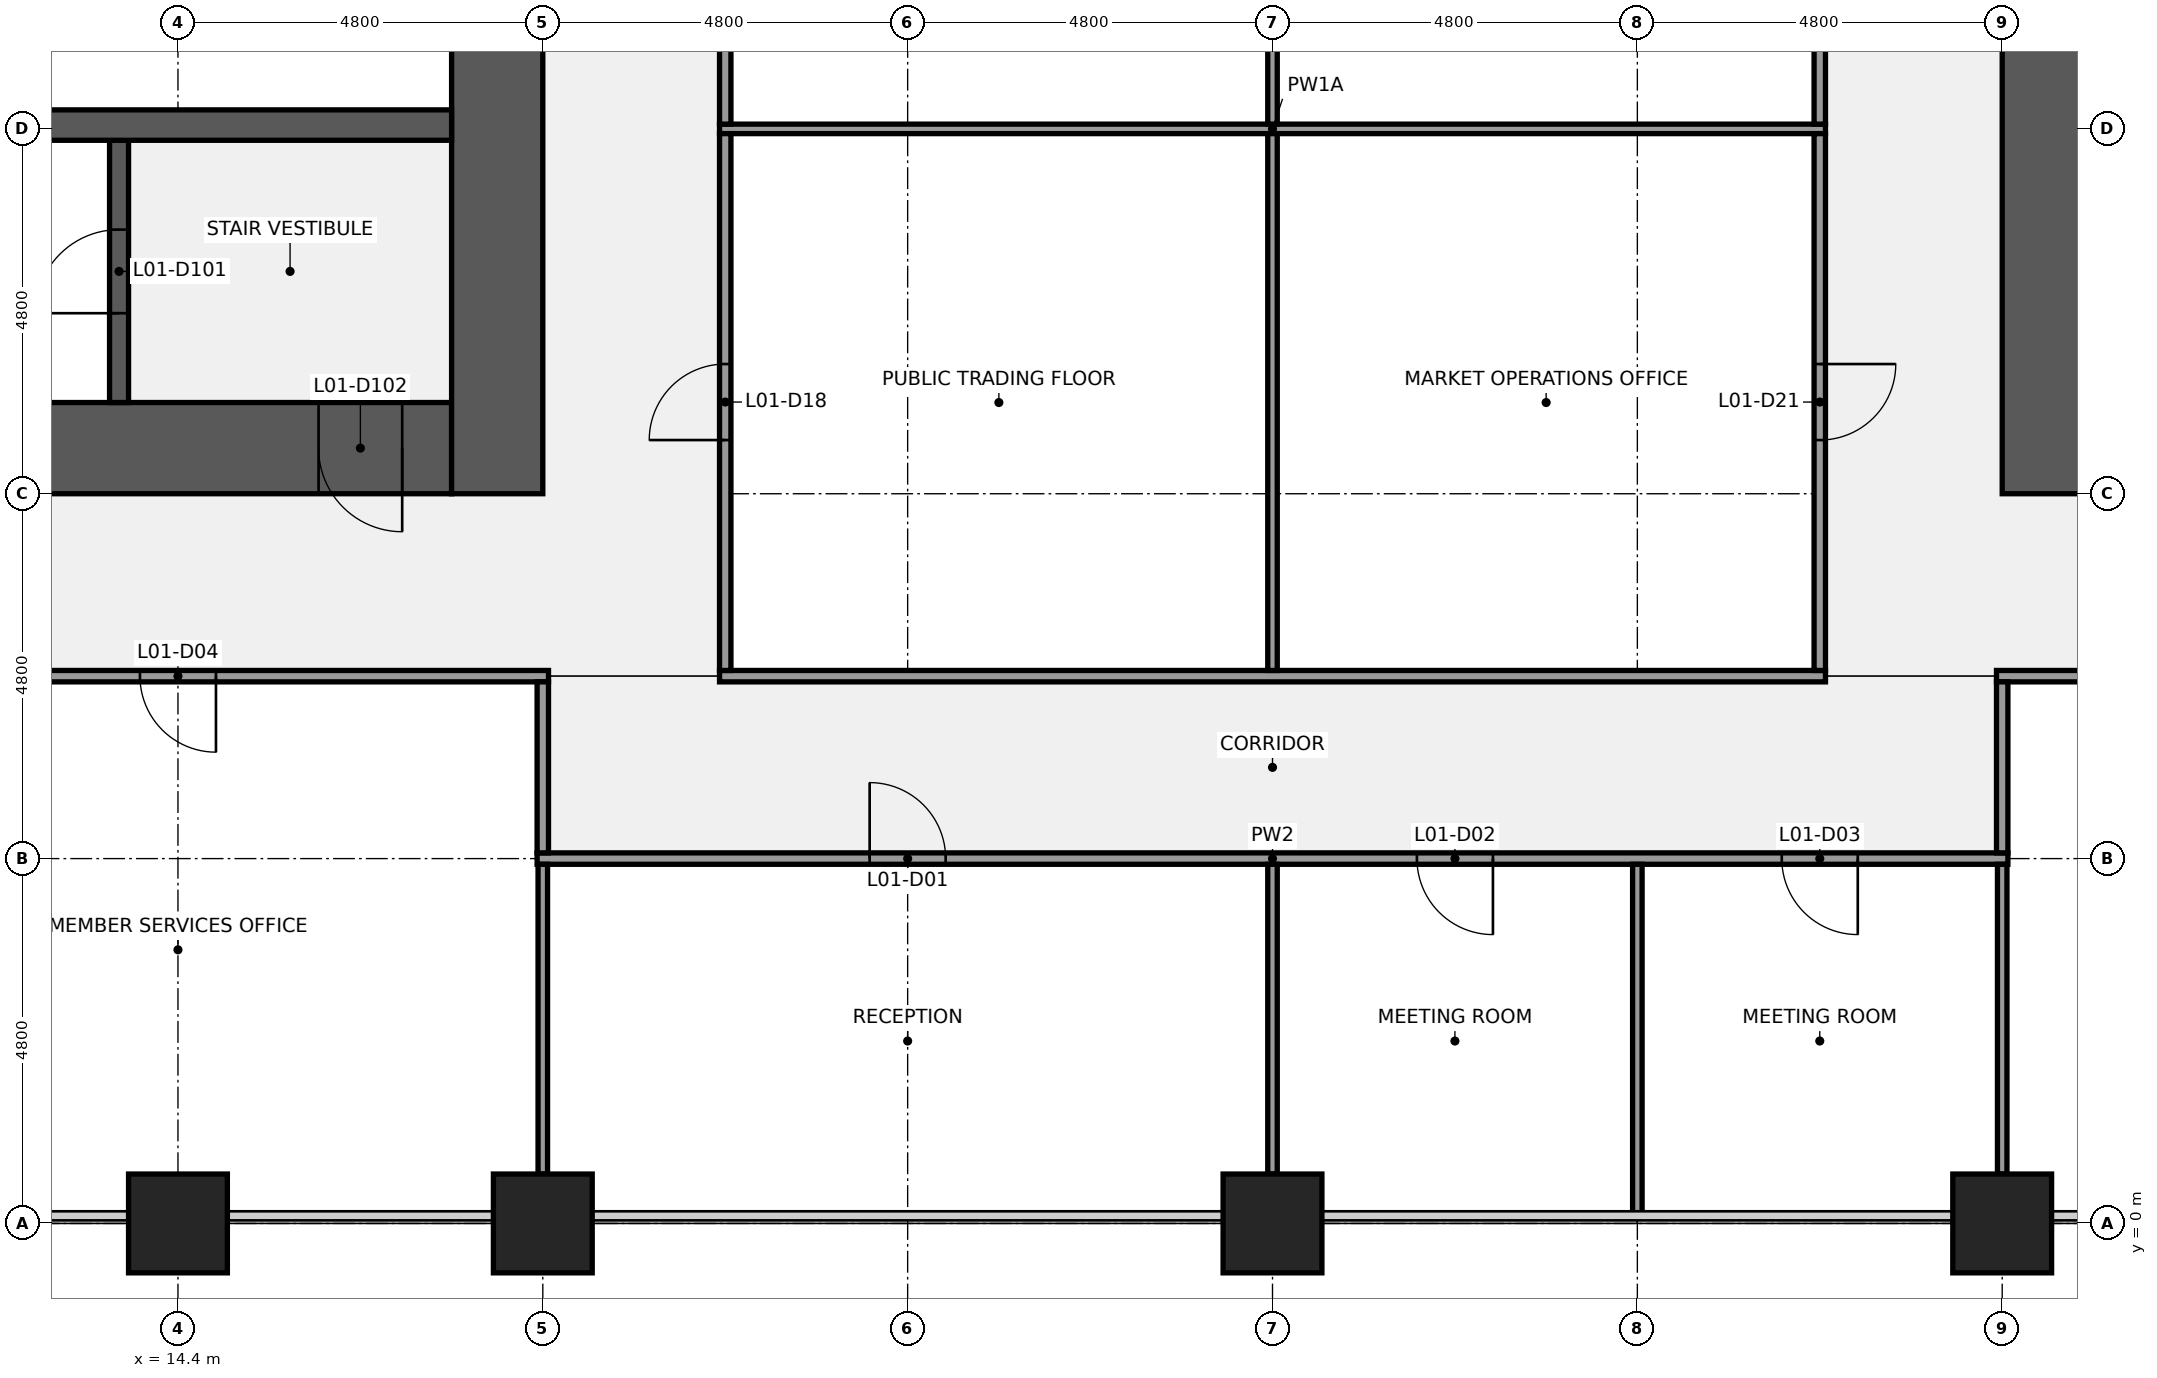
"""IFC4 building model, lengths in metres.
Left out: names, types, materials, properties, quantities, classifications, styles, units other than length and angle.
Written with IfcOpenShell. Run it as: python <this file> out.ifc"""

import sys

from ifc_helpers import new_model, si_unit, direction, frame, frame_2d, origin, origin_2d, place, context, subcontext, project, spatial, rectangle, extrude, element, fill, save


model = new_model("IFC4")
c1 = context("Model", 3, precision=1e-05, world=origin(), true_north=direction((0.0, 1.0)))
c2 = subcontext(c1, "Body", "Model", "MODEL_VIEW")
j1 = project(units=[si_unit("LENGTHUNIT", "METRE"), si_unit("PLANEANGLEUNIT", "RADIAN")], contexts=[c1])
p1 = place(None, origin())
s1 = spatial("IfcSite", under=j1, at=p1, CompositionType="ELEMENT")
p2 = place(p1, origin())
s2 = spatial("IfcBuilding", under=s1, at=p2, CompositionType="ELEMENT")
p3 = place(p2, frame((0.0, 0.0, 12.6)))
s3 = spatial("IfcBuildingStorey", under=s2, at=p3, CompositionType="ELEMENT", Elevation=12.6)
for number, where, z_axis, x_axis in (
    (1, (14.4, 0.0, 0.0), (0.0, 0.0, 1.0), (1.0, 0.0, 0.0)),
    (2, (19.2, 0.0, 0.0), (0.0, 0.0, 1.0), (1.0, 0.0, 0.0)),
    (3, (28.8, 0.0, 0.0), (0.0, 0.0, 1.0), (1.0, 0.0, 0.0)),
    (4, (38.4, 0.0, 0.0), (0.0, 0.0, 1.0), (1.0, 0.0, 0.0)),
):
    element("IfcColumn", number, at=place(p3, frame(where, z_axis=z_axis, x_axis=x_axis)), inside=s3, PredefinedType="COLUMN", context=c2, shape_type="SweptSolid", body=[
        extrude(rectangle(XDim=1.3, YDim=1.3, at=origin_2d()), origin(), (0.0, 0.0, 1.0), 4.4),
    ])
p4 = place(p3, frame((18.0, 10.2, 0.0), z_axis=(0.0, 0.0, 1.0), x_axis=(-1.0, 0.0, 0.0)))
e5 = element("IfcWall", 5, at=p4, inside=s3, PredefinedType="SHEAR", context=c2, shape_type="SweptSolid", body=[
    extrude(rectangle(XDim=13.2, YDim=1.2, at=frame_2d((6.6, 0.0))), origin(), (0.0, 0.0, 1.0), 4.24),
])
p5 = place(p4, frame((0.65, 0.0, 0.0)))
e6 = element("IfcOpeningElement", 6, at=p5, cuts=e5, PredefinedType="OPENING", context=c2, shape_type="SweptSolid", body=[
    extrude(rectangle(XDim=1.1, YDim=2.1, at=frame_2d((0.55, 1.05))), frame((0.0, 0.61, 0.0), z_axis=(0.0, -1.0, 0.0), x_axis=(1.0, 0.0, 0.0)), (0.0, 0.0, 1.0), 1.22),
])
p6 = place(p3, frame((18.6, 38.4, 0.0), z_axis=(0.0, 0.0, 1.0), x_axis=(0.0, -1.0, 0.0)))
e7 = element("IfcWall", 7, at=p6, inside=s3, PredefinedType="SHEAR", context=c2, shape_type="SweptSolid", body=[
    extrude(rectangle(XDim=28.8, YDim=1.2, at=frame_2d((14.4, 0.0))), origin(), (0.0, 0.0, 1.0), 4.24),
])
p7 = place(p6, frame((18.3, 0.0, 0.0)))
e8 = element("IfcOpeningElement", 8, at=p7, cuts=e7, PredefinedType="OPENING", context=c2, shape_type="SweptSolid", body=[
    extrude(rectangle(XDim=1.8, YDim=2.1, at=frame_2d((0.9, 1.05))), frame((0.0, 0.61, 0.0), z_axis=(0.0, -1.0, 0.0), x_axis=(1.0, 0.0, 0.0)), (0.0, 0.0, 1.0), 1.22),
])
p8 = place(p6, frame((8.7, 0.0, 0.0)))
e9 = element("IfcOpeningElement", 9, at=p8, cuts=e7, PredefinedType="OPENING", context=c2, shape_type="SweptSolid", body=[
    extrude(rectangle(XDim=1.8, YDim=2.1, at=frame_2d((0.9, 1.05))), frame((0.0, 0.61, 0.0), z_axis=(0.0, -1.0, 0.0), x_axis=(1.0, 0.0, 0.0)), (0.0, 0.0, 1.0), 1.22),
])
p9 = place(p3, frame((13.625, 10.8, 0.0), z_axis=(0.0, 0.0, 1.0), x_axis=(0.0, 1.0, 0.0)))
e10 = element("IfcWall", 10, at=p9, inside=s3, PredefinedType="SHEAR", context=c2, shape_type="SweptSolid", body=[
    extrude(rectangle(XDim=3.45, YDim=0.25, at=frame_2d((1.725, 0.0))), origin(), (0.0, 0.0, 1.0), 4.24),
])
p10 = place(p9, frame((1.175, 0.0, 0.0)))
e11 = element("IfcOpeningElement", 11, at=p10, cuts=e10, PredefinedType="OPENING", context=c2, shape_type="SweptSolid", body=[
    extrude(rectangle(XDim=1.1, YDim=2.1, at=frame_2d((0.55, 1.05))), frame((0.0, 0.135, 0.0), z_axis=(0.0, -1.0, 0.0), x_axis=(1.0, 0.0, 0.0)), (0.0, 0.0, 1.0), 0.27),
])
p11 = place(p3, frame((1.2, 14.45, 0.0), z_axis=(0.0, 0.0, 1.0), x_axis=(1.0, 0.0, 0.0)))
e12 = element("IfcWall", 12, at=p11, inside=s3, PredefinedType="SHEAR", context=c2, shape_type="SweptSolid", body=[
    extrude(rectangle(XDim=16.8, YDim=0.4, at=frame_2d((8.4, 0.0))), origin(), (0.0, 0.0, 1.0), 4.24),
])
p12 = place(p3, frame((39.0, 9.6, 0.0), z_axis=(0.0, 0.0, 1.0), x_axis=(0.0, 1.0, 0.0)))
e13 = element("IfcWall", 13, at=p12, inside=s3, PredefinedType="SHEAR", context=c2, shape_type="SweptSolid", body=[
    extrude(rectangle(XDim=28.8, YDim=1.2, at=frame_2d((14.4, 0.0))), origin(), (0.0, 0.0, 1.0), 4.24),
])
p13 = place(p12, frame((8.7, 0.0, 0.0)))
e14 = element("IfcOpeningElement", 14, at=p13, cuts=e13, PredefinedType="OPENING", context=c2, shape_type="SweptSolid", body=[
    extrude(rectangle(XDim=1.8, YDim=2.1, at=frame_2d((0.9, 1.05))), frame((0.0, 0.61, 0.0), z_axis=(0.0, -1.0, 0.0), x_axis=(1.0, 0.0, 0.0)), (0.0, 0.0, 1.0), 1.22),
])
p14 = place(p12, frame((18.3, 0.0, 0.0)))
e15 = element("IfcOpeningElement", 15, at=p14, cuts=e13, PredefinedType="OPENING", context=c2, shape_type="SweptSolid", body=[
    extrude(rectangle(XDim=1.8, YDim=2.1, at=frame_2d((0.9, 1.05))), frame((0.0, 0.61, 0.0), z_axis=(0.0, -1.0, 0.0), x_axis=(1.0, 0.0, 0.0)), (0.0, 0.0, 1.0), 1.22),
])
p15 = place(p3, frame((19.125, 4.8, 0.0), z_axis=(0.0, 0.0, 1.0), x_axis=(1.0, 0.0, 0.0)))
e16 = element("IfcWall", 16, at=p15, inside=s3, PredefinedType="PARTITIONING", context=c2, shape_type="SweptSolid", body=[
    extrude(rectangle(XDim=19.35, YDim=0.15, at=frame_2d((9.675, 0.0))), origin(), (0.0, 0.0, 1.0), 3.27),
])
p16 = place(p15, frame((4.375, 0.0, 0.0)))
e17 = element("IfcOpeningElement", 17, at=p16, cuts=e16, PredefinedType="OPENING", context=c2, shape_type="SweptSolid", body=[
    extrude(rectangle(XDim=1.0, YDim=2.1, at=frame_2d((0.5, 1.05))), frame((0.0, 0.085, 0.0), z_axis=(0.0, -1.0, 0.0), x_axis=(1.0, 0.0, 0.0)), (0.0, 0.0, 1.0), 0.17),
])
p17 = place(p15, frame((11.575, 0.0, 0.0)))
e18 = element("IfcOpeningElement", 18, at=p17, cuts=e16, PredefinedType="OPENING", context=c2, shape_type="SweptSolid", body=[
    extrude(rectangle(XDim=1.0, YDim=2.1, at=frame_2d((0.5, 1.05))), frame((0.0, 0.085, 0.0), z_axis=(0.0, -1.0, 0.0), x_axis=(1.0, 0.0, 0.0)), (0.0, 0.0, 1.0), 0.17),
])
p18 = place(p15, frame((16.375, 0.0, 0.0)))
e19 = element("IfcOpeningElement", 19, at=p18, cuts=e16, PredefinedType="OPENING", context=c2, shape_type="SweptSolid", body=[
    extrude(rectangle(XDim=1.0, YDim=2.1, at=frame_2d((0.5, 1.05))), frame((0.0, 0.085, 0.0), z_axis=(0.0, -1.0, 0.0), x_axis=(1.0, 0.0, 0.0)), (0.0, 0.0, 1.0), 0.17),
])
p19 = place(p3, frame((9.525, 7.2, 0.0), z_axis=(0.0, 0.0, 1.0), x_axis=(1.0, 0.0, 0.0)))
e20 = element("IfcWall", 20, at=p19, inside=s3, PredefinedType="PARTITIONING", context=c2, shape_type="SweptSolid", body=[
    extrude(rectangle(XDim=9.75, YDim=0.15, at=frame_2d((4.875, 0.0))), origin(), (0.0, 0.0, 1.0), 3.27),
])
p20 = place(p19, frame((4.375, 0.0, 0.0)))
e21 = element("IfcOpeningElement", 21, at=p20, cuts=e20, PredefinedType="OPENING", context=c2, shape_type="SweptSolid", body=[
    extrude(rectangle(XDim=1.0, YDim=2.1, at=frame_2d((0.5, 1.05))), frame((0.0, 0.085, 0.0), z_axis=(0.0, -1.0, 0.0), x_axis=(1.0, 0.0, 0.0)), (0.0, 0.0, 1.0), 0.17),
])
p21 = place(p3, frame((21.525, 7.2, 0.0), z_axis=(0.0, 0.0, 1.0), x_axis=(1.0, 0.0, 0.0)))
e22 = element("IfcWall", 22, at=p21, inside=s3, PredefinedType="PARTITIONING", context=c2, shape_type="SweptSolid", body=[
    extrude(rectangle(XDim=14.55, YDim=0.15, at=frame_2d((7.275, 0.0))), origin(), (0.0, 0.0, 1.0), 3.27),
])
p22 = place(p3, frame((38.325, 7.2, 0.0), z_axis=(0.0, 0.0, 1.0), x_axis=(1.0, 0.0, 0.0)))
e23 = element("IfcWall", 23, at=p22, inside=s3, PredefinedType="PARTITIONING", context=c2, shape_type="SweptSolid", body=[
    extrude(rectangle(XDim=9.75, YDim=0.15, at=frame_2d((4.875, 0.0))), origin(), (0.0, 0.0, 1.0), 3.27),
])
p23 = place(p22, frame((4.375, 0.0, 0.0)))
e24 = element("IfcOpeningElement", 24, at=p23, cuts=e23, PredefinedType="OPENING", context=c2, shape_type="SweptSolid", body=[
    extrude(rectangle(XDim=1.0, YDim=2.1, at=frame_2d((0.5, 1.05))), frame((0.0, 0.085, 0.0), z_axis=(0.0, -1.0, 0.0), x_axis=(1.0, 0.0, 0.0)), (0.0, 0.0, 1.0), 0.17),
])
p24 = place(p3, frame((21.525, 14.4, 0.0), z_axis=(0.0, 0.0, 1.0), x_axis=(1.0, 0.0, 0.0)))
e25 = element("IfcWall", 25, at=p24, inside=s3, PredefinedType="PARTITIONING", context=c2, shape_type="SweptSolid", body=[
    extrude(rectangle(XDim=14.55, YDim=0.125, at=frame_2d((7.275, 0.0))), origin(), (0.0, 0.0, 1.0), 3.27),
])
p25 = place(p3, frame((19.2, 0.65, 0.0), z_axis=(0.0, 0.0, 1.0), x_axis=(0.0, 1.0, 0.0)))
e26 = element("IfcWall", 26, at=p25, inside=s3, PredefinedType="PARTITIONING", context=c2, shape_type="SweptSolid", body=[
    extrude(rectangle(XDim=4.075, YDim=0.125, at=frame_2d((2.038, 0.0))), origin(), (0.0, 0.0, 1.0), 3.27),
])
p26 = place(p3, frame((19.2, 4.875, 0.0), z_axis=(0.0, 0.0, 1.0), x_axis=(0.0, 1.0, 0.0)))
e27 = element("IfcWall", 27, at=p26, inside=s3, PredefinedType="PARTITIONING", context=c2, shape_type="SweptSolid", body=[
    extrude(rectangle(XDim=2.25, YDim=0.15, at=frame_2d((1.125, 0.0))), origin(), (0.0, 0.0, 1.0), 3.27),
])
p27 = place(p3, frame((21.6, 7.275, 0.0), z_axis=(0.0, 0.0, 1.0), x_axis=(0.0, 1.0, 0.0)))
e28 = element("IfcWall", 28, at=p27, inside=s3, PredefinedType="PARTITIONING", context=c2, shape_type="SweptSolid", body=[
    extrude(rectangle(XDim=7.062, YDim=0.15, at=frame_2d((3.531, 0.0))), origin(), (0.0, 0.0, 1.0), 3.27),
])
p28 = place(p27, frame((3.031, 0.0, 0.0)))
e29 = element("IfcOpeningElement", 29, at=p28, cuts=e28, PredefinedType="OPENING", context=c2, shape_type="SweptSolid", body=[
    extrude(rectangle(XDim=1.0, YDim=2.1, at=frame_2d((0.5, 1.05))), frame((0.0, 0.085, 0.0), z_axis=(0.0, -1.0, 0.0), x_axis=(1.0, 0.0, 0.0)), (0.0, 0.0, 1.0), 0.17),
])
p29 = place(p3, frame((21.6, 14.462, 0.0), z_axis=(0.0, 0.0, 1.0), x_axis=(0.0, 1.0, 0.0)))
e30 = element("IfcWall", 30, at=p29, inside=s3, PredefinedType="PARTITIONING", context=c2, shape_type="SweptSolid", body=[
    extrude(rectangle(XDim=9.475, YDim=0.15, at=frame_2d((4.738, 0.0))), origin(), (0.0, 0.0, 1.0), 3.27),
])
p30 = place(p29, frame((4.238, 0.0, 0.0)))
e31 = element("IfcOpeningElement", 31, at=p30, cuts=e30, PredefinedType="OPENING", context=c2, shape_type="SweptSolid", body=[
    extrude(rectangle(XDim=1.0, YDim=2.1, at=frame_2d((0.5, 1.05))), frame((0.0, 0.085, 0.0), z_axis=(0.0, -1.0, 0.0), x_axis=(1.0, 0.0, 0.0)), (0.0, 0.0, 1.0), 0.17),
])
p31 = place(p3, frame((28.8, 0.65, 0.0), z_axis=(0.0, 0.0, 1.0), x_axis=(0.0, 1.0, 0.0)))
e32 = element("IfcWall", 32, at=p31, inside=s3, PredefinedType="PARTITIONING", context=c2, shape_type="SweptSolid", body=[
    extrude(rectangle(XDim=4.075, YDim=0.125, at=frame_2d((2.038, 0.0))), origin(), (0.0, 0.0, 1.0), 3.27),
])
p32 = place(p3, frame((28.8, 7.275, 0.0), z_axis=(0.0, 0.0, 1.0), x_axis=(0.0, 1.0, 0.0)))
e33 = element("IfcWall", 33, at=p32, inside=s3, PredefinedType="PARTITIONING", context=c2, shape_type="SweptSolid", body=[
    extrude(rectangle(XDim=7.062, YDim=0.125, at=frame_2d((3.531, 0.0))), origin(), (0.0, 0.0, 1.0), 3.27),
])
p33 = place(p3, frame((28.8, 14.462, 0.0), z_axis=(0.0, 0.0, 1.0), x_axis=(0.0, 1.0, 0.0)))
e34 = element("IfcWall", 34, at=p33, inside=s3, PredefinedType="PARTITIONING", context=c2, shape_type="SweptSolid", body=[
    extrude(rectangle(XDim=9.475, YDim=0.125, at=frame_2d((4.738, 0.0))), origin(), (0.0, 0.0, 1.0), 3.27),
])
p34 = place(p3, frame((33.6, 0.1, 0.0), z_axis=(0.0, 0.0, 1.0), x_axis=(0.0, 1.0, 0.0)))
e35 = element("IfcWall", 35, at=p34, inside=s3, PredefinedType="PARTITIONING", context=c2, shape_type="SweptSolid", body=[
    extrude(rectangle(XDim=4.625, YDim=0.125, at=frame_2d((2.312, 0.0))), origin(), (0.0, 0.0, 1.0), 3.27),
])
p35 = place(p3, frame((36.0, 7.275, 0.0), z_axis=(0.0, 0.0, 1.0), x_axis=(0.0, 1.0, 0.0)))
e36 = element("IfcWall", 36, at=p35, inside=s3, PredefinedType="PARTITIONING", context=c2, shape_type="SweptSolid", body=[
    extrude(rectangle(XDim=7.062, YDim=0.15, at=frame_2d((3.531, 0.0))), origin(), (0.0, 0.0, 1.0), 3.27),
])
p36 = place(p35, frame((3.031, 0.0, 0.0)))
e37 = element("IfcOpeningElement", 37, at=p36, cuts=e36, PredefinedType="OPENING", context=c2, shape_type="SweptSolid", body=[
    extrude(rectangle(XDim=1.0, YDim=2.1, at=frame_2d((0.5, 1.05))), frame((0.0, 0.085, 0.0), z_axis=(0.0, -1.0, 0.0), x_axis=(1.0, 0.0, 0.0)), (0.0, 0.0, 1.0), 0.17),
])
p37 = place(p3, frame((36.0, 14.462, 0.0), z_axis=(0.0, 0.0, 1.0), x_axis=(0.0, 1.0, 0.0)))
e38 = element("IfcWall", 38, at=p37, inside=s3, PredefinedType="PARTITIONING", context=c2, shape_type="SweptSolid", body=[
    extrude(rectangle(XDim=9.475, YDim=0.15, at=frame_2d((4.738, 0.0))), origin(), (0.0, 0.0, 1.0), 3.27),
])
p38 = place(p37, frame((4.238, 0.0, 0.0)))
e39 = element("IfcOpeningElement", 39, at=p38, cuts=e38, PredefinedType="OPENING", context=c2, shape_type="SweptSolid", body=[
    extrude(rectangle(XDim=1.0, YDim=2.1, at=frame_2d((0.5, 1.05))), frame((0.0, 0.085, 0.0), z_axis=(0.0, -1.0, 0.0), x_axis=(1.0, 0.0, 0.0)), (0.0, 0.0, 1.0), 0.17),
])
p39 = place(p3, frame((38.4, 0.65, 0.0), z_axis=(0.0, 0.0, 1.0), x_axis=(0.0, 1.0, 0.0)))
e40 = element("IfcWall", 40, at=p39, inside=s3, PredefinedType="PARTITIONING", context=c2, shape_type="SweptSolid", body=[
    extrude(rectangle(XDim=4.075, YDim=0.125, at=frame_2d((2.038, 0.0))), origin(), (0.0, 0.0, 1.0), 3.27),
])
p40 = place(p3, frame((38.4, 4.875, 0.0), z_axis=(0.0, 0.0, 1.0), x_axis=(0.0, 1.0, 0.0)))
e41 = element("IfcWall", 41, at=p40, inside=s3, PredefinedType="PARTITIONING", context=c2, shape_type="SweptSolid", body=[
    extrude(rectangle(XDim=2.25, YDim=0.15, at=frame_2d((1.125, 0.0))), origin(), (0.0, 0.0, 1.0), 3.27),
])
for number, where, z_axis, x_axis in (
    (42, (14.4, -1.075, 0.0), (0.0, 0.0, 1.0), (1.0, 0.0, 0.0)),
    (43, (19.2, -1.075, 0.0), (0.0, 0.0, 1.0), (1.0, 0.0, 0.0)),
    (44, (38.4, -1.075, 0.0), (0.0, 0.0, 1.0), (1.0, 0.0, 0.0)),
):
    element("IfcColumn", number, at=place(p3, frame(where, z_axis=z_axis, x_axis=x_axis)), inside=s3, PredefinedType="PILASTER", context=c2, shape_type="SweptSolid", body=[
        extrude(rectangle(XDim=4.2, YDim=0.85, at=origin_2d()), origin(), (0.0, 0.0, 1.0), 4.4),
    ])
p41 = place(p10, origin())
e45 = element("IfcDoor", 45, at=p41, inside=s3, OperationType="SINGLE_SWING_LEFT", PredefinedType="DOOR", context=c2, shape_type="SweptSolid", body=[
    extrude(rectangle(XDim=1.1, YDim=2.1, at=frame_2d((0.55, 1.05))), frame((0.0, 0.025, 0.0), z_axis=(0.0, -1.0, 0.0), x_axis=(1.0, 0.0, 0.0)), (0.0, 0.0, 1.0), 0.05),
])
fill(e11, e45)
p42 = place(p5, origin())
e46 = element("IfcDoor", 46, at=p42, inside=s3, OperationType="SINGLE_SWING_LEFT", PredefinedType="DOOR", context=c2, shape_type="SweptSolid", body=[
    extrude(rectangle(XDim=1.1, YDim=2.1, at=frame_2d((0.55, 1.05))), frame((0.0, 0.025, 0.0), z_axis=(0.0, -1.0, 0.0), x_axis=(1.0, 0.0, 0.0)), (0.0, 0.0, 1.0), 0.05),
])
fill(e6, e46)
p43 = place(p16, origin())
e47 = element("IfcDoor", 47, at=p43, inside=s3, OperationType="SINGLE_SWING_LEFT", PredefinedType="DOOR", context=c2, shape_type="SweptSolid", body=[
    extrude(rectangle(XDim=1.0, YDim=2.1, at=frame_2d((0.5, 1.05))), frame((0.0, 0.025, 0.0), z_axis=(0.0, -1.0, 0.0), x_axis=(1.0, 0.0, 0.0)), (0.0, 0.0, 1.0), 0.05),
])
fill(e17, e47)
p44 = place(p17, origin())
e48 = element("IfcDoor", 48, at=p44, inside=s3, OperationType="SINGLE_SWING_RIGHT", PredefinedType="DOOR", context=c2, shape_type="SweptSolid", body=[
    extrude(rectangle(XDim=1.0, YDim=2.1, at=frame_2d((0.5, 1.05))), frame((0.0, 0.025, 0.0), z_axis=(0.0, -1.0, 0.0), x_axis=(1.0, 0.0, 0.0)), (0.0, 0.0, 1.0), 0.05),
])
fill(e18, e48)
p45 = place(p18, origin())
e49 = element("IfcDoor", 49, at=p45, inside=s3, OperationType="SINGLE_SWING_RIGHT", PredefinedType="DOOR", context=c2, shape_type="SweptSolid", body=[
    extrude(rectangle(XDim=1.0, YDim=2.1, at=frame_2d((0.5, 1.05))), frame((0.0, 0.025, 0.0), z_axis=(0.0, -1.0, 0.0), x_axis=(1.0, 0.0, 0.0)), (0.0, 0.0, 1.0), 0.05),
])
fill(e19, e49)
p46 = place(p20, origin())
e50 = element("IfcDoor", 50, at=p46, inside=s3, OperationType="SINGLE_SWING_RIGHT", PredefinedType="DOOR", context=c2, shape_type="SweptSolid", body=[
    extrude(rectangle(XDim=1.0, YDim=2.1, at=frame_2d((0.5, 1.05))), frame((0.0, 0.025, 0.0), z_axis=(0.0, -1.0, 0.0), x_axis=(1.0, 0.0, 0.0)), (0.0, 0.0, 1.0), 0.05),
])
fill(e21, e50)
p47 = place(p28, origin())
e51 = element("IfcDoor", 51, at=p47, inside=s3, OperationType="SINGLE_SWING_LEFT", PredefinedType="DOOR", context=c2, shape_type="SweptSolid", body=[
    extrude(rectangle(XDim=1.0, YDim=2.1, at=frame_2d((0.5, 1.05))), frame((0.0, 0.025, 0.0), z_axis=(0.0, -1.0, 0.0), x_axis=(1.0, 0.0, 0.0)), (0.0, 0.0, 1.0), 0.05),
])
fill(e29, e51)
p48 = place(p36, origin())
e52 = element("IfcDoor", 52, at=p48, inside=s3, OperationType="SINGLE_SWING_RIGHT", PredefinedType="DOOR", context=c2, shape_type="SweptSolid", body=[
    extrude(rectangle(XDim=1.0, YDim=2.1, at=frame_2d((0.5, 1.05))), frame((0.0, 0.025, 0.0), z_axis=(0.0, -1.0, 0.0), x_axis=(1.0, 0.0, 0.0)), (0.0, 0.0, 1.0), 0.05),
])
fill(e37, e52)
save(model, sys.argv[1])
